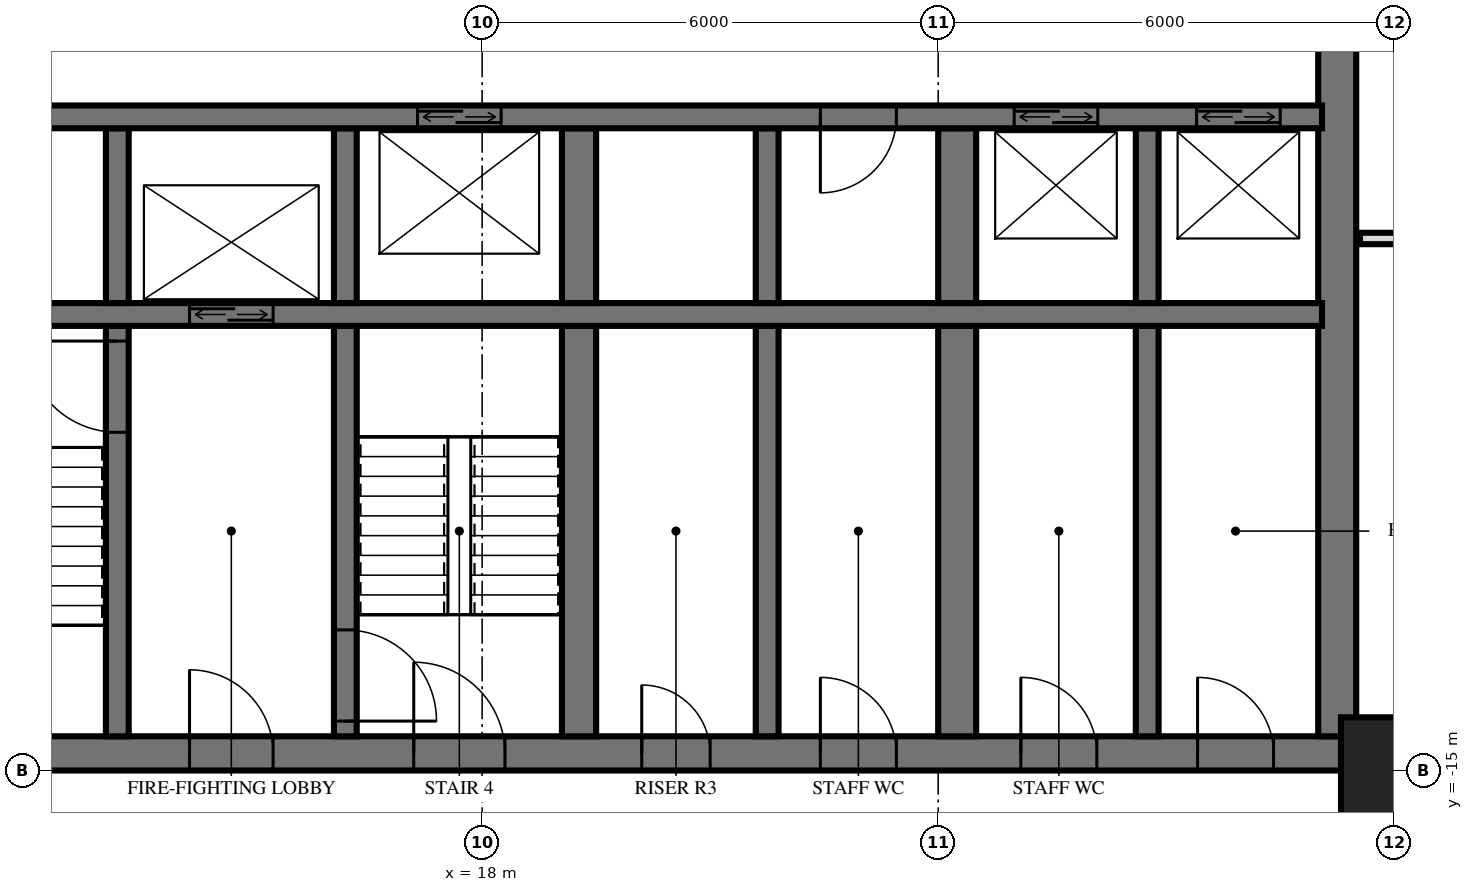
"""IFC4 building model, lengths in metres.
Left out: names, types, materials, properties, quantities, classifications, styles, units other than length and angle.
Written with IfcOpenShell. Run it as: python <this file> out.ifc"""

import sys

from ifc_helpers import new_model, si_unit, direction, frame, frame_2d, origin, origin_2d, place, context, subcontext, project, spatial, rectangle, extrude, element, fill, save


model = new_model("IFC4")
c1 = context("Model", 3, precision=1e-05, world=origin(), true_north=direction((0.0, 1.0)))
c2 = subcontext(c1, "Body", "Model", "MODEL_VIEW")
j1 = project(units=[si_unit("LENGTHUNIT", "METRE"), si_unit("PLANEANGLEUNIT", "RADIAN")], contexts=[c1])
p1 = place(None, origin())
s1 = spatial("IfcSite", under=j1, at=p1, CompositionType="ELEMENT")
p2 = place(p1, origin())
s2 = spatial("IfcBuilding", under=s1, at=p2, CompositionType="ELEMENT")
p3 = place(p2, frame((0.0, 0.0, 56.4)))
s3 = spatial("IfcBuildingStorey", under=s2, at=p3, CompositionType="ELEMENT", Elevation=56.4)
p4 = place(p3, frame((30.0, -15.0, 0.0), z_axis=(0.0, 0.0, 1.0), x_axis=(1.0, 0.0, 0.0)))
e1 = element("IfcColumn", 1, at=p4, inside=s3, PredefinedType="COLUMN", context=c2, shape_type="SweptSolid", body=[
    extrude(rectangle(XDim=1.4, YDim=1.4, at=origin_2d()), origin(), (0.0, 0.0, 1.0), 3.6),
])
p5 = place(p3, frame((10.0, -14.775, 0.0), z_axis=(0.0, 0.0, 1.0), x_axis=(1.0, 0.0, 0.0)))
e2 = element("IfcWall", 2, at=p5, inside=s3, PredefinedType="SHEAR", context=c2, shape_type="SweptSolid", body=[
    extrude(rectangle(XDim=19.5, YDim=0.45, at=frame_2d((9.75, 0.0))), origin(), (0.0, 0.0, 1.0), 3.6),
])
p6 = place(p5, frame((7.1, 0.0, 0.0)))
e3 = element("IfcOpeningElement", 3, at=p6, cuts=e2, PredefinedType="OPENING", context=c2, shape_type="SweptSolid", body=[
    extrude(rectangle(XDim=1.2, YDim=2.1, at=frame_2d((0.6, 1.05))), frame((0.0, 0.235, 0.0), z_axis=(0.0, -1.0, 0.0), x_axis=(1.0, 0.0, 0.0)), (0.0, 0.0, 1.0), 0.47),
])
p7 = place(p5, frame((4.15, 0.0, 0.0)))
e4 = element("IfcOpeningElement", 4, at=p7, cuts=e2, PredefinedType="OPENING", context=c2, shape_type="SweptSolid", body=[
    extrude(rectangle(XDim=1.1, YDim=2.1, at=frame_2d((0.55, 1.05))), frame((0.0, 0.235, 0.0), z_axis=(0.0, -1.0, 0.0), x_axis=(1.0, 0.0, 0.0)), (0.0, 0.0, 1.0), 0.47),
])
p8 = place(p5, frame((10.1, 0.0, 0.0)))
e5 = element("IfcOpeningElement", 5, at=p8, cuts=e2, PredefinedType="OPENING", context=c2, shape_type="SweptSolid", body=[
    extrude(rectangle(XDim=0.9, YDim=2.1, at=frame_2d((0.45, 1.05))), frame((0.0, 0.235, 0.0), z_axis=(0.0, -1.0, 0.0), x_axis=(1.0, 0.0, 0.0)), (0.0, 0.0, 1.0), 0.47),
])
p9 = place(p5, frame((12.45, 0.0, 0.0)))
e6 = element("IfcOpeningElement", 6, at=p9, cuts=e2, PredefinedType="OPENING", context=c2, shape_type="SweptSolid", body=[
    extrude(rectangle(XDim=1.0, YDim=2.1, at=frame_2d((0.5, 1.05))), frame((0.0, 0.235, 0.0), z_axis=(0.0, -1.0, 0.0), x_axis=(1.0, 0.0, 0.0)), (0.0, 0.0, 1.0), 0.47),
])
p10 = place(p5, frame((15.087, 0.0, 0.0)))
e7 = element("IfcOpeningElement", 7, at=p10, cuts=e2, PredefinedType="OPENING", context=c2, shape_type="SweptSolid", body=[
    extrude(rectangle(XDim=1.0, YDim=2.1, at=frame_2d((0.5, 1.05))), frame((0.0, 0.235, 0.0), z_axis=(0.0, -1.0, 0.0), x_axis=(1.0, 0.0, 0.0)), (0.0, 0.0, 1.0), 0.47),
])
p11 = place(p5, frame((17.413, 0.0, 0.0)))
e8 = element("IfcOpeningElement", 8, at=p11, cuts=e2, PredefinedType="OPENING", context=c2, shape_type="SweptSolid", body=[
    extrude(rectangle(XDim=1.0, YDim=2.1, at=frame_2d((0.5, 1.05))), frame((0.0, 0.235, 0.0), z_axis=(0.0, -1.0, 0.0), x_axis=(1.0, 0.0, 0.0)), (0.0, 0.0, 1.0), 0.47),
])
p12 = place(p3, frame((29.25, -14.55, 0.0), z_axis=(0.0, 0.0, 1.0), x_axis=(0.0, 1.0, 0.0)))
e9 = element("IfcWall", 9, at=p12, inside=s3, PredefinedType="SHEAR", context=c2, shape_type="SweptSolid", body=[
    extrude(rectangle(XDim=14.1, YDim=0.5, at=frame_2d((7.05, 0.0))), origin(), (0.0, 0.0, 1.0), 3.6),
])
p13 = place(p3, frame((10.35, -6.4, 0.0), z_axis=(0.0, 0.0, 1.0), x_axis=(1.0, 0.0, 0.0)))
e10 = element("IfcWall", 10, at=p13, inside=s3, PredefinedType="SHEAR", context=c2, shape_type="SweptSolid", body=[
    extrude(rectangle(XDim=18.7, YDim=0.3, at=frame_2d((9.35, 0.0))), origin(), (0.0, 0.0, 1.0), 3.6),
])
p14 = place(p13, frame((14.65, 0.0, 0.0)))
e11 = element("IfcOpeningElement", 11, at=p14, cuts=e10, PredefinedType="OPENING", context=c2, shape_type="SweptSolid", body=[
    extrude(rectangle(XDim=1.1, YDim=2.1, at=frame_2d((0.55, 1.05))), frame((0.0, 0.16, 0.0), z_axis=(0.0, -1.0, 0.0), x_axis=(1.0, 0.0, 0.0)), (0.0, 0.0, 1.0), 0.32),
])
p15 = place(p13, frame((17.05, 0.0, 0.0)))
e12 = element("IfcOpeningElement", 12, at=p15, cuts=e10, PredefinedType="OPENING", context=c2, shape_type="SweptSolid", body=[
    extrude(rectangle(XDim=1.1, YDim=2.1, at=frame_2d((0.55, 1.05))), frame((0.0, 0.16, 0.0), z_axis=(0.0, -1.0, 0.0), x_axis=(1.0, 0.0, 0.0)), (0.0, 0.0, 1.0), 0.32),
])
p16 = place(p13, frame((6.8, 0.0, 0.0)))
e13 = element("IfcOpeningElement", 13, at=p16, cuts=e10, PredefinedType="OPENING", context=c2, shape_type="SweptSolid", body=[
    extrude(rectangle(XDim=1.1, YDim=2.1, at=frame_2d((0.55, 1.05))), frame((0.0, 0.16, 0.0), z_axis=(0.0, -1.0, 0.0), x_axis=(1.0, 0.0, 0.0)), (0.0, 0.0, 1.0), 0.32),
])
p17 = place(p13, frame((12.1, 0.0, 0.0)))
e14 = element("IfcOpeningElement", 14, at=p17, cuts=e10, PredefinedType="OPENING", context=c2, shape_type="SweptSolid", body=[
    extrude(rectangle(XDim=1.0, YDim=2.1, at=frame_2d((0.5, 1.05))), frame((0.0, 0.16, 0.0), z_axis=(0.0, -1.0, 0.0), x_axis=(1.0, 0.0, 0.0)), (0.0, 0.0, 1.0), 0.32),
])
p18 = place(p3, frame((10.35, -9.0, 0.0), z_axis=(0.0, 0.0, 1.0), x_axis=(1.0, 0.0, 0.0)))
e15 = element("IfcWall", 15, at=p18, inside=s3, PredefinedType="SHEAR", context=c2, shape_type="SweptSolid", body=[
    extrude(rectangle(XDim=18.7, YDim=0.3, at=frame_2d((9.35, 0.0))), origin(), (0.0, 0.0, 1.0), 3.6),
])
p19 = place(p18, frame((3.8, 0.0, 0.0)))
e16 = element("IfcOpeningElement", 16, at=p19, cuts=e15, PredefinedType="OPENING", context=c2, shape_type="SweptSolid", body=[
    extrude(rectangle(XDim=1.1, YDim=2.1, at=frame_2d((0.55, 1.05))), frame((0.0, 0.16, 0.0), z_axis=(0.0, -1.0, 0.0), x_axis=(1.0, 0.0, 0.0)), (0.0, 0.0, 1.0), 0.32),
])
p20 = place(p3, frame((13.2, -8.85, 0.0), z_axis=(0.0, 0.0, 1.0), x_axis=(0.0, 1.0, 0.0)))
e17 = element("IfcWall", 17, at=p20, inside=s3, PredefinedType="SHEAR", context=c2, shape_type="SweptSolid", body=[
    extrude(rectangle(XDim=2.3, YDim=0.3, at=frame_2d((1.15, 0.0))), origin(), (0.0, 0.0, 1.0), 3.6),
])
p21 = place(p3, frame((13.2, -14.55, 0.0), z_axis=(0.0, 0.0, 1.0), x_axis=(0.0, 1.0, 0.0)))
e18 = element("IfcWall", 18, at=p21, inside=s3, PredefinedType="SHEAR", context=c2, shape_type="SweptSolid", body=[
    extrude(rectangle(XDim=5.4, YDim=0.3, at=frame_2d((2.7, 0.0))), origin(), (0.0, 0.0, 1.0), 3.6),
])
p22 = place(p21, frame((4.0, 0.0, 0.0)))
e19 = element("IfcOpeningElement", 19, at=p22, cuts=e18, PredefinedType="OPENING", context=c2, shape_type="SweptSolid", body=[
    extrude(rectangle(XDim=1.2, YDim=2.1, at=frame_2d((0.6, 1.05))), frame((0.0, 0.16, 0.0), z_axis=(0.0, -1.0, 0.0), x_axis=(1.0, 0.0, 0.0)), (0.0, 0.0, 1.0), 0.32),
])
p23 = place(p3, frame((16.2, -8.85, 0.0), z_axis=(0.0, 0.0, 1.0), x_axis=(0.0, 1.0, 0.0)))
e20 = element("IfcWall", 20, at=p23, inside=s3, PredefinedType="SHEAR", context=c2, shape_type="SweptSolid", body=[
    extrude(rectangle(XDim=2.3, YDim=0.3, at=frame_2d((1.15, 0.0))), origin(), (0.0, 0.0, 1.0), 3.6),
])
p24 = place(p3, frame((16.2, -14.55, 0.0), z_axis=(0.0, 0.0, 1.0), x_axis=(0.0, 1.0, 0.0)))
e21 = element("IfcWall", 21, at=p24, inside=s3, PredefinedType="SHEAR", context=c2, shape_type="SweptSolid", body=[
    extrude(rectangle(XDim=5.4, YDim=0.3, at=frame_2d((2.7, 0.0))), origin(), (0.0, 0.0, 1.0), 3.6),
])
p25 = place(p24, frame((0.2, 0.0, 0.0)))
e22 = element("IfcOpeningElement", 22, at=p25, cuts=e21, PredefinedType="OPENING", context=c2, shape_type="SweptSolid", body=[
    extrude(rectangle(XDim=1.2, YDim=2.1, at=frame_2d((0.6, 1.05))), frame((0.0, 0.16, 0.0), z_axis=(0.0, -1.0, 0.0), x_axis=(1.0, 0.0, 0.0)), (0.0, 0.0, 1.0), 0.32),
])
p26 = place(p3, frame((19.275, -8.85, 0.0), z_axis=(0.0, 0.0, 1.0), x_axis=(0.0, 1.0, 0.0)))
e23 = element("IfcWall", 23, at=p26, inside=s3, PredefinedType="SHEAR", context=c2, shape_type="SweptSolid", body=[
    extrude(rectangle(XDim=2.3, YDim=0.45, at=frame_2d((1.15, 0.0))), origin(), (0.0, 0.0, 1.0), 3.6),
])
p27 = place(p3, frame((19.275, -14.55, 0.0), z_axis=(0.0, 0.0, 1.0), x_axis=(0.0, 1.0, 0.0)))
e24 = element("IfcWall", 24, at=p27, inside=s3, PredefinedType="SHEAR", context=c2, shape_type="SweptSolid", body=[
    extrude(rectangle(XDim=5.4, YDim=0.45, at=frame_2d((2.7, 0.0))), origin(), (0.0, 0.0, 1.0), 3.6),
])
p28 = place(p3, frame((21.75, -8.85, 0.0), z_axis=(0.0, 0.0, 1.0), x_axis=(0.0, 1.0, 0.0)))
e25 = element("IfcWall", 25, at=p28, inside=s3, PredefinedType="SHEAR", context=c2, shape_type="SweptSolid", body=[
    extrude(rectangle(XDim=2.3, YDim=0.3, at=frame_2d((1.15, 0.0))), origin(), (0.0, 0.0, 1.0), 3.6),
])
p29 = place(p3, frame((21.75, -14.55, 0.0), z_axis=(0.0, 0.0, 1.0), x_axis=(0.0, 1.0, 0.0)))
e26 = element("IfcWall", 26, at=p29, inside=s3, PredefinedType="SHEAR", context=c2, shape_type="SweptSolid", body=[
    extrude(rectangle(XDim=5.4, YDim=0.3, at=frame_2d((2.7, 0.0))), origin(), (0.0, 0.0, 1.0), 3.6),
])
p30 = place(p3, frame((24.25, -8.85, 0.0), z_axis=(0.0, 0.0, 1.0), x_axis=(0.0, 1.0, 0.0)))
e27 = element("IfcWall", 27, at=p30, inside=s3, PredefinedType="SHEAR", context=c2, shape_type="SweptSolid", body=[
    extrude(rectangle(XDim=2.3, YDim=0.5, at=frame_2d((1.15, 0.0))), origin(), (0.0, 0.0, 1.0), 3.6),
])
p31 = place(p3, frame((24.25, -14.55, 0.0), z_axis=(0.0, 0.0, 1.0), x_axis=(0.0, 1.0, 0.0)))
e28 = element("IfcWall", 28, at=p31, inside=s3, PredefinedType="SHEAR", context=c2, shape_type="SweptSolid", body=[
    extrude(rectangle(XDim=5.4, YDim=0.5, at=frame_2d((2.7, 0.0))), origin(), (0.0, 0.0, 1.0), 3.6),
])
p32 = place(p3, frame((26.75, -8.85, 0.0), z_axis=(0.0, 0.0, 1.0), x_axis=(0.0, 1.0, 0.0)))
e29 = element("IfcWall", 29, at=p32, inside=s3, PredefinedType="SHEAR", context=c2, shape_type="SweptSolid", body=[
    extrude(rectangle(XDim=2.3, YDim=0.3, at=frame_2d((1.15, 0.0))), origin(), (0.0, 0.0, 1.0), 3.6),
])
p33 = place(p3, frame((26.75, -14.55, 0.0), z_axis=(0.0, 0.0, 1.0), x_axis=(0.0, 1.0, 0.0)))
e30 = element("IfcWall", 30, at=p33, inside=s3, PredefinedType="SHEAR", context=c2, shape_type="SweptSolid", body=[
    extrude(rectangle(XDim=5.4, YDim=0.3, at=frame_2d((2.7, 0.0))), origin(), (0.0, 0.0, 1.0), 3.6),
])
p34 = place(p3, frame((29.55, -15.0, 0.0), z_axis=(0.0, 0.0, 1.0), x_axis=(1.0, 0.0, 0.0)))
e31 = element("IfcWall", 31, at=p34, inside=s3, PredefinedType="PARTITIONING", context=c2, shape_type="SweptSolid", body=[
    extrude(rectangle(XDim=3.57, YDim=0.15, at=frame_2d((1.785, 0.0))), origin(), (0.0, 0.0, 1.0), 3.32),
])
p35 = place(p34, frame((1.205, 0.0, 0.0)))
e32 = element("IfcOpeningElement", 32, at=p35, cuts=e31, PredefinedType="OPENING", context=c2, shape_type="SweptSolid", body=[
    extrude(rectangle(XDim=0.8, YDim=2.1, at=frame_2d((0.4, 1.05))), frame((0.0, 0.085, 0.0), z_axis=(0.0, -1.0, 0.0), x_axis=(1.0, 0.0, 0.0)), (0.0, 0.0, 1.0), 0.17),
])
p36 = place(p3, frame((29.55, -8.0, 0.0), z_axis=(0.0, 0.0, 1.0), x_axis=(1.0, 0.0, 0.0)))
e33 = element("IfcWall", 33, at=p36, inside=s3, PredefinedType="PARTITIONING", context=c2, shape_type="SweptSolid", body=[
    extrude(rectangle(XDim=3.57, YDim=0.15, at=frame_2d((1.785, 0.0))), origin(), (0.0, 0.0, 1.0), 3.32),
])
p37 = place(p36, frame((1.4, 0.0, 0.0)))
e34 = element("IfcOpeningElement", 34, at=p37, cuts=e33, PredefinedType="OPENING", context=c2, shape_type="SweptSolid", body=[
    extrude(rectangle(XDim=0.9, YDim=2.1, at=frame_2d((0.45, 1.05))), frame((0.0, 0.085, 0.0), z_axis=(0.0, -1.0, 0.0), x_axis=(1.0, 0.0, 0.0)), (0.0, 0.0, 1.0), 0.17),
])
p38 = place(p14, origin())
e35 = element("IfcDoor", 35, at=p38, inside=s3, OperationType="DOUBLE_DOOR_SLIDING", PredefinedType="USERDEFINED", context=c2, shape_type="SweptSolid", body=[
    extrude(rectangle(XDim=1.1, YDim=2.1, at=frame_2d((0.55, 1.05))), frame((0.0, 0.025, 0.0), z_axis=(0.0, -1.0, 0.0), x_axis=(1.0, 0.0, 0.0)), (0.0, 0.0, 1.0), 0.05),
])
fill(e11, e35)
p39 = place(p15, origin())
e36 = element("IfcDoor", 36, at=p39, inside=s3, OperationType="DOUBLE_DOOR_SLIDING", PredefinedType="USERDEFINED", context=c2, shape_type="SweptSolid", body=[
    extrude(rectangle(XDim=1.1, YDim=2.1, at=frame_2d((0.55, 1.05))), frame((0.0, 0.025, 0.0), z_axis=(0.0, -1.0, 0.0), x_axis=(1.0, 0.0, 0.0)), (0.0, 0.0, 1.0), 0.05),
])
fill(e12, e36)
p40 = place(p19, origin())
e37 = element("IfcDoor", 37, at=p40, inside=s3, OperationType="DOUBLE_DOOR_SLIDING", PredefinedType="USERDEFINED", context=c2, shape_type="SweptSolid", body=[
    extrude(rectangle(XDim=1.1, YDim=2.1, at=frame_2d((0.55, 1.05))), frame((0.0, 0.025, 0.0), z_axis=(0.0, -1.0, 0.0), x_axis=(1.0, 0.0, 0.0)), (0.0, 0.0, 1.0), 0.05),
])
fill(e16, e37)
p41 = place(p16, origin())
e38 = element("IfcDoor", 38, at=p41, inside=s3, OperationType="DOUBLE_DOOR_SLIDING", PredefinedType="USERDEFINED", context=c2, shape_type="SweptSolid", body=[
    extrude(rectangle(XDim=1.1, YDim=2.1, at=frame_2d((0.55, 1.05))), frame((0.0, 0.025, 0.0), z_axis=(0.0, -1.0, 0.0), x_axis=(1.0, 0.0, 0.0)), (0.0, 0.0, 1.0), 0.05),
])
fill(e13, e38)
p42 = place(p6, origin())
e39 = element("IfcDoor", 39, at=p42, inside=s3, OperationType="SINGLE_SWING_RIGHT", PredefinedType="DOOR", context=c2, shape_type="SweptSolid", body=[
    extrude(rectangle(XDim=1.2, YDim=2.1, at=frame_2d((0.6, 1.05))), frame((0.0, 0.025, 0.0), z_axis=(0.0, -1.0, 0.0), x_axis=(1.0, 0.0, 0.0)), (0.0, 0.0, 1.0), 0.05),
])
fill(e3, e39)
p43 = place(p7, origin())
e40 = element("IfcDoor", 40, at=p43, inside=s3, OperationType="SINGLE_SWING_RIGHT", PredefinedType="DOOR", context=c2, shape_type="SweptSolid", body=[
    extrude(rectangle(XDim=1.1, YDim=2.1, at=frame_2d((0.55, 1.05))), frame((0.0, 0.025, 0.0), z_axis=(0.0, -1.0, 0.0), x_axis=(1.0, 0.0, 0.0)), (0.0, 0.0, 1.0), 0.05),
])
fill(e4, e40)
p44 = place(p8, origin())
e41 = element("IfcDoor", 41, at=p44, inside=s3, OperationType="SINGLE_SWING_RIGHT", PredefinedType="DOOR", context=c2, shape_type="SweptSolid", body=[
    extrude(rectangle(XDim=0.9, YDim=2.1, at=frame_2d((0.45, 1.05))), frame((0.0, 0.025, 0.0), z_axis=(0.0, -1.0, 0.0), x_axis=(1.0, 0.0, 0.0)), (0.0, 0.0, 1.0), 0.05),
])
fill(e5, e41)
p45 = place(p9, origin())
e42 = element("IfcDoor", 42, at=p45, inside=s3, OperationType="SINGLE_SWING_RIGHT", PredefinedType="DOOR", context=c2, shape_type="SweptSolid", body=[
    extrude(rectangle(XDim=1.0, YDim=2.1, at=frame_2d((0.5, 1.05))), frame((0.0, 0.025, 0.0), z_axis=(0.0, -1.0, 0.0), x_axis=(1.0, 0.0, 0.0)), (0.0, 0.0, 1.0), 0.05),
])
fill(e6, e42)
p46 = place(p10, origin())
e43 = element("IfcDoor", 43, at=p46, inside=s3, OperationType="SINGLE_SWING_RIGHT", PredefinedType="DOOR", context=c2, shape_type="SweptSolid", body=[
    extrude(rectangle(XDim=1.0, YDim=2.1, at=frame_2d((0.5, 1.05))), frame((0.0, 0.025, 0.0), z_axis=(0.0, -1.0, 0.0), x_axis=(1.0, 0.0, 0.0)), (0.0, 0.0, 1.0), 0.05),
])
fill(e7, e43)
p47 = place(p11, origin())
e44 = element("IfcDoor", 44, at=p47, inside=s3, OperationType="SINGLE_SWING_RIGHT", PredefinedType="DOOR", context=c2, shape_type="SweptSolid", body=[
    extrude(rectangle(XDim=1.0, YDim=2.1, at=frame_2d((0.5, 1.05))), frame((0.0, 0.025, 0.0), z_axis=(0.0, -1.0, 0.0), x_axis=(1.0, 0.0, 0.0)), (0.0, 0.0, 1.0), 0.05),
])
fill(e8, e44)
p48 = place(p17, frame((0.5, 0.0, 0.0), z_axis=(0.0, 0.0, 1.0), x_axis=(-1.0, 0.0, 0.0)))
e45 = element("IfcDoor", 45, at=p48, inside=s3, OperationType="SINGLE_SWING_LEFT", PredefinedType="DOOR", context=c2, shape_type="SweptSolid", body=[
    extrude(rectangle(XDim=1.0, YDim=2.1, at=frame_2d((0.0, 1.05))), frame((0.0, -0.025, 0.0), z_axis=(0.0, 1.0, 0.0), x_axis=(-1.0, 0.0, 0.0)), (0.0, 0.0, 1.0), 0.05),
])
fill(e14, e45)
p49 = place(p22, origin())
e46 = element("IfcDoor", 46, at=p49, inside=s3, OperationType="SINGLE_SWING_LEFT", PredefinedType="DOOR", context=c2, shape_type="SweptSolid", body=[
    extrude(rectangle(XDim=1.2, YDim=2.1, at=frame_2d((0.6, 1.05))), frame((0.0, 0.025, 0.0), z_axis=(0.0, -1.0, 0.0), x_axis=(1.0, 0.0, 0.0)), (0.0, 0.0, 1.0), 0.05),
])
fill(e19, e46)
p50 = place(p25, frame((0.6, 0.0, 0.0), z_axis=(0.0, 0.0, 1.0), x_axis=(-1.0, 0.0, 0.0)))
e47 = element("IfcDoor", 47, at=p50, inside=s3, OperationType="SINGLE_SWING_LEFT", PredefinedType="DOOR", context=c2, shape_type="SweptSolid", body=[
    extrude(rectangle(XDim=1.2, YDim=2.1, at=frame_2d((0.0, 1.05))), frame((0.0, -0.025, 0.0), z_axis=(0.0, 1.0, 0.0), x_axis=(-1.0, 0.0, 0.0)), (0.0, 0.0, 1.0), 0.05),
])
fill(e22, e47)
save(model, sys.argv[1])
